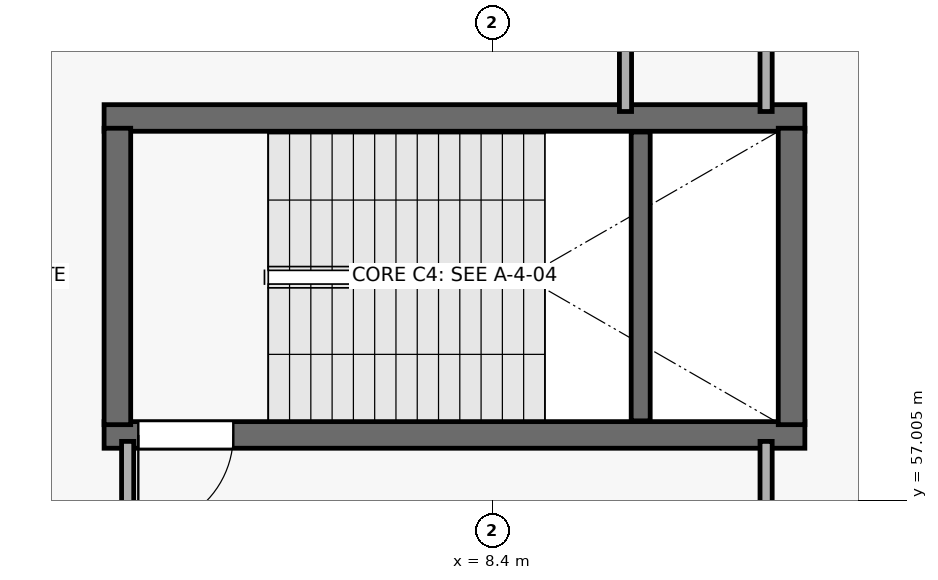
"""IFC4 building model, lengths in metres.
Left out: names, types, materials, properties, quantities, classifications, styles, units other than length and angle.
Written with IfcOpenShell. Run it as: python <this file> out.ifc"""

import sys

from ifc_helpers import new_model, si_unit, direction, frame, frame_2d, origin, place, context, subcontext, project, spatial, rectangle, extrude, element, fill, save


model = new_model("IFC4")
c1 = context("Model", 3, precision=1e-05, world=origin(), true_north=direction((0.0, 1.0)))
c2 = subcontext(c1, "Body", "Model", "MODEL_VIEW")
j1 = project(units=[si_unit("LENGTHUNIT", "METRE"), si_unit("PLANEANGLEUNIT", "RADIAN")], contexts=[c1])
p1 = place(None, origin())
s1 = spatial("IfcSite", under=j1, at=p1, CompositionType="ELEMENT")
p2 = place(p1, origin())
s2 = spatial("IfcBuilding", under=s1, at=p2, CompositionType="ELEMENT")
p3 = place(p2, frame((0.0, 0.0, 10.2)))
s3 = spatial("IfcBuildingStorey", under=s2, at=p3, CompositionType="ELEMENT", Elevation=10.2)
p4 = place(p3, frame((3.29, 57.865, 0.0), z_axis=(0.0, 0.0, 1.0), x_axis=(1.0, 0.0, 0.0)))
e1 = element("IfcWall", 1, at=p4, inside=s3, PredefinedType="SHEAR", context=c2, shape_type="SweptSolid", body=[
    extrude(rectangle(XDim=9.22, YDim=0.35, at=frame_2d((4.61, 0.0))), origin(), (0.0, 0.0, 1.0), 4.82),
])
p5 = place(p4, frame((0.45, 0.0, 0.0)))
e2 = element("IfcOpeningElement", 2, at=p5, cuts=e1, PredefinedType="OPENING", context=c2, shape_type="SweptSolid", body=[
    extrude(rectangle(XDim=1.25, YDim=2.2, at=frame_2d((0.625, 1.1))), frame((0.0, 0.185, 0.0), z_axis=(0.0, -1.0, 0.0), x_axis=(1.0, 0.0, 0.0)), (0.0, 0.0, 1.0), 0.37),
])
p6 = place(p3, frame((12.51, 62.035, 0.0), z_axis=(0.0, 0.0, 1.0), x_axis=(-1.0, 0.0, 0.0)))
e3 = element("IfcWall", 3, at=p6, inside=s3, PredefinedType="SHEAR", context=c2, shape_type="SweptSolid", body=[
    extrude(rectangle(XDim=9.22, YDim=0.35, at=frame_2d((4.61, 0.0))), origin(), (0.0, 0.0, 1.0), 4.82),
])
for number, where, z_axis, x_axis in (
    (4, (3.465, 58.0, 0.0), (0.0, 0.0, 1.0), (0.0, 1.0, 0.0)),
    (5, (12.335, 61.9, 0.0), (0.0, 0.0, 1.0), (0.0, -1.0, 0.0)),
):
    element("IfcWall", number, at=place(p3, frame(where, z_axis=z_axis, x_axis=x_axis)), inside=s3, PredefinedType="SHEAR", context=c2, shape_type="SweptSolid", body=[
        extrude(rectangle(XDim=3.9, YDim=0.35, at=frame_2d((1.95, 0.0))), origin(), (0.0, 0.0, 1.0), 4.82),
    ])
p7 = place(p3, frame((10.35, 58.05, 0.0), z_axis=(0.0, 0.0, 1.0), x_axis=(0.0, 1.0, 0.0)))
e6 = element("IfcWall", 6, at=p7, inside=s3, PredefinedType="SHEAR", context=c2, shape_type="SweptSolid", body=[
    extrude(rectangle(XDim=3.8, YDim=0.25, at=frame_2d((1.9, 0.0))), origin(), (0.0, 0.0, 1.0), 2.37),
])
p8 = place(p3, frame((12.0, 62.12, 0.0), z_axis=(0.0, 0.0, 1.0), x_axis=(0.0, 1.0, 0.0)))
e7 = element("IfcWall", 7, at=p8, inside=s3, PredefinedType="PARTITIONING", context=c2, shape_type="SweptSolid", body=[
    extrude(rectangle(XDim=19.68, YDim=0.16, at=frame_2d((9.84, 0.0))), origin(), (0.0, 0.0, 1.0), 4.82),
])
p9 = place(p8, frame((9.02, 0.0, 0.0)))
e8 = element("IfcOpeningElement", 8, at=p9, cuts=e7, PredefinedType="OPENING", context=c2, shape_type="SweptSolid", body=[
    extrude(rectangle(XDim=1.64, YDim=2.42, at=frame_2d((0.82, 1.21))), frame((0.0, 0.09, 0.0), z_axis=(0.0, -1.0, 0.0), x_axis=(1.0, 0.0, 0.0)), (0.0, 0.0, 1.0), 0.18),
])
p10 = place(p3, frame((10.15, 81.8, 0.0), z_axis=(0.0, 0.0, 1.0), x_axis=(0.0, -1.0, 0.0)))
e9 = element("IfcWall", 9, at=p10, inside=s3, PredefinedType="PARTITIONING", context=c2, shape_type="SweptSolid", body=[
    extrude(rectangle(XDim=19.68, YDim=0.16, at=frame_2d((9.84, 0.0))), origin(), (0.0, 0.0, 1.0), 4.82),
])
p11 = place(p3, frame((3.6, 57.78, 0.0), z_axis=(0.0, 0.0, 1.0), x_axis=(0.0, -1.0, 0.0)))
e10 = element("IfcWall", 10, at=p11, inside=s3, PredefinedType="PARTITIONING", context=c2, shape_type="SweptSolid", body=[
    extrude(rectangle(XDim=5.02, YDim=0.16, at=frame_2d((2.51, 0.0))), origin(), (0.0, 0.0, 1.0), 4.82),
])
p12 = place(p3, frame((12.0, 54.8, 0.0), z_axis=(0.0, 0.0, 1.0), x_axis=(0.0, 1.0, 0.0)))
e11 = element("IfcWall", 11, at=p12, inside=s3, PredefinedType="PARTITIONING", context=c2, shape_type="SweptSolid", body=[
    extrude(rectangle(XDim=2.98, YDim=0.16, at=frame_2d((1.49, 0.0))), origin(), (0.0, 0.0, 1.0), 4.82),
])
p13 = place(p5, origin())
e12 = element("IfcDoor", 12, at=p13, inside=s3, OperationType="SINGLE_SWING_RIGHT", PredefinedType="DOOR", context=c2, shape_type="SweptSolid", body=[
    extrude(rectangle(XDim=1.25, YDim=2.2, at=frame_2d((0.625, 1.1))), frame((0.0, 0.025, 0.0), z_axis=(0.0, -1.0, 0.0), x_axis=(1.0, 0.0, 0.0)), (0.0, 0.0, 1.0), 0.05),
])
fill(e2, e12)
save(model, sys.argv[1])
